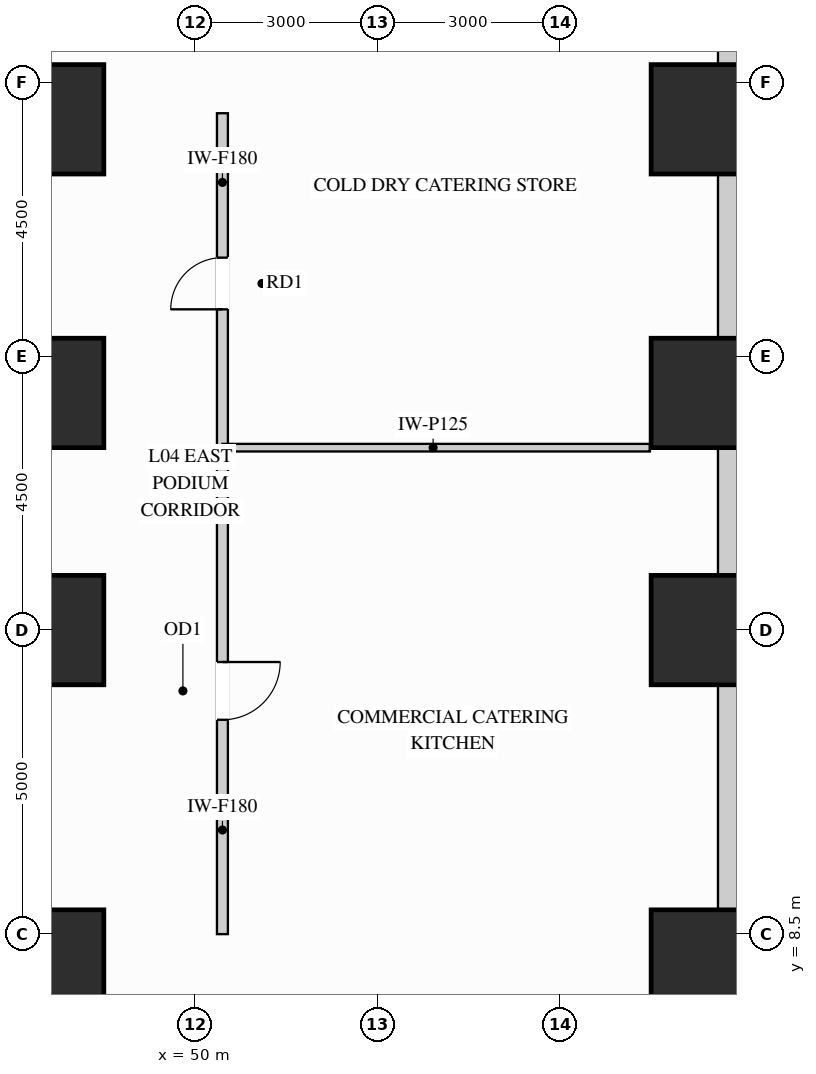
"""IFC4 building model, lengths in metres.
Left out: names, types, materials, properties, quantities, classifications, styles, units other than length and angle.
Written with IfcOpenShell. Run it as: python <this file> out.ifc"""

import sys

from ifc_helpers import new_model, si_unit, direction, frame, frame_2d, origin, origin_2d, place, context, subcontext, project, spatial, rectangle, extrude, source, transform, mapped, element, fill, save


model = new_model("IFC4")
c1 = context("Model", 3, precision=1e-05, world=origin(), true_north=direction((0.0, 1.0)))
c2 = subcontext(c1, "Body", "Model", "MODEL_VIEW")
j1 = project(units=[si_unit("LENGTHUNIT", "METRE"), si_unit("PLANEANGLEUNIT", "RADIAN")], contexts=[c1])
p1 = place(None, origin())
s1 = spatial("IfcSite", under=j1, at=p1, CompositionType="ELEMENT")
p2 = place(p1, origin())
s2 = spatial("IfcBuilding", under=s1, at=p2, CompositionType="ELEMENT")
p3 = place(p2, frame((0.0, 0.0, 18.0)))
s3 = spatial("IfcBuildingStorey", under=s2, at=p3, CompositionType="ELEMENT", Elevation=18.0)
m1 = source(origin(), c2, "Body", "SweptSolid", [
    extrude(rectangle(XDim=1.8, YDim=1.8, at=origin_2d()), origin(), (0.0, 0.0, 1.0), 4.28),
])
for number, where, z_axis, x_axis in (
    (1, (58.4, 8.0, 0.0), (0.0, 0.0, 1.0), (1.0, 0.0, 0.0)),
    (2, (58.4, 13.5, 0.0), (0.0, 0.0, 1.0), (1.0, 0.0, 0.0)),
    (3, (58.4, 17.4, 0.0), (0.0, 0.0, 1.0), (1.0, 0.0, 0.0)),
    (4, (58.4, 21.9, 0.0), (0.0, 0.0, 1.0), (1.0, 0.0, 0.0)),
    (5, (47.6, 8.0, 0.0), (0.0, 0.0, 1.0), (1.0, 0.0, 0.0)),
    (6, (47.6, 13.5, 0.0), (0.0, 0.0, 1.0), (1.0, 0.0, 0.0)),
    (7, (47.6, 17.4, 0.0), (0.0, 0.0, 1.0), (1.0, 0.0, 0.0)),
    (8, (47.6, 21.9, 0.0), (0.0, 0.0, 1.0), (1.0, 0.0, 0.0)),
):
    element("IfcColumn", number, at=place(p3, frame(where, z_axis=z_axis, x_axis=x_axis)), inside=s3, PredefinedType="COLUMN", context=c2, shape_type="MappedRepresentation", body=[
        mapped(m1, transform((0.0, 0.0, 0.0), x_axis=(1.0, 0.0, 0.0), y_axis=(0.0, 1.0, 0.0), z_axis=(0.0, 0.0, 1.0))),
    ])
m2 = source(origin(), c2, "Body", "SweptSolid", [
    extrude(rectangle(XDim=3.704, YDim=0.4, at=frame_2d((1.852, 0.0))), origin(), (0.0, 0.0, 1.0), 1.865),
])
p4 = place(p3, frame((58.8, 8.898, 0.0), z_axis=(0.0, 0.0, 1.0), x_axis=(0.0, 1.0, 0.0)))
e9 = element("IfcWall", 9, at=p4, inside=s3, PredefinedType="SOLIDWALL", context=c2, shape_type="MappedRepresentation", body=[
    mapped(m2, transform((0.0, 0.0, 0.0), x_axis=(1.0, 0.0, 0.0), y_axis=(0.0, 1.0, 0.0), z_axis=(0.0, 0.0, 1.0))),
])
m3 = source(origin(), c2, "Body", "SweptSolid", [
    extrude(rectangle(XDim=2.104, YDim=0.4, at=frame_2d((1.052, 0.0))), origin(), (0.0, 0.0, 1.0), 1.865),
])
p5 = place(p3, frame((58.8, 14.398, 0.0), z_axis=(0.0, 0.0, 1.0), x_axis=(0.0, 1.0, 0.0)))
e10 = element("IfcWall", 10, at=p5, inside=s3, PredefinedType="SOLIDWALL", context=c2, shape_type="MappedRepresentation", body=[
    mapped(m3, transform((0.0, 0.0, 0.0), x_axis=(1.0, 0.0, 0.0), y_axis=(0.0, 1.0, 0.0), z_axis=(0.0, 0.0, 1.0))),
])
m4 = source(origin(), c2, "Body", "SweptSolid", [
    extrude(rectangle(XDim=2.704, YDim=0.4, at=frame_2d((1.352, 0.0))), origin(), (0.0, 0.0, 1.0), 1.865),
])
p6 = place(p3, frame((58.8, 18.298, 0.0), z_axis=(0.0, 0.0, 1.0), x_axis=(0.0, 1.0, 0.0)))
e11 = element("IfcWall", 11, at=p6, inside=s3, PredefinedType="SOLIDWALL", context=c2, shape_type="MappedRepresentation", body=[
    mapped(m4, transform((0.0, 0.0, 0.0), x_axis=(1.0, 0.0, 0.0), y_axis=(0.0, 1.0, 0.0), z_axis=(0.0, 0.0, 1.0))),
])
m5 = source(origin(), c2, "Body", "SweptSolid", [
    extrude(rectangle(XDim=1.504, YDim=0.4, at=frame_2d((0.752, 0.0))), origin(), (0.0, 0.0, 1.0), 1.865),
])
p7 = place(p3, frame((58.8, 22.798, 0.0), z_axis=(0.0, 0.0, 1.0), x_axis=(0.0, 1.0, 0.0)))
e12 = element("IfcWall", 12, at=p7, inside=s3, PredefinedType="SOLIDWALL", context=c2, shape_type="MappedRepresentation", body=[
    mapped(m5, transform((0.0, 0.0, 0.0), x_axis=(1.0, 0.0, 0.0), y_axis=(0.0, 1.0, 0.0), z_axis=(0.0, 0.0, 1.0))),
])
p8 = place(p3, frame((50.45, 8.5, 0.0), z_axis=(0.0, 0.0, 1.0), x_axis=(0.0, 1.0, 0.0)))
e13 = element("IfcWall", 13, at=p8, inside=s3, PredefinedType="PARTITIONING", context=c2, shape_type="SweptSolid", body=[
    extrude(rectangle(XDim=8.0, YDim=0.18, at=frame_2d((4.0, 0.0))), origin(), (0.0, 0.0, 1.0), 4.265),
])
p9 = place(p8, frame((3.525, 0.0, 0.0)))
e14 = element("IfcOpeningElement", 14, at=p9, cuts=e13, PredefinedType="OPENING", context=c2, shape_type="SweptSolid", body=[
    extrude(rectangle(XDim=0.95, YDim=2.15, at=frame_2d((0.475, 1.075))), frame((0.0, 0.1, 0.0), z_axis=(0.0, -1.0, 0.0), x_axis=(1.0, 0.0, 0.0)), (0.0, 0.0, 1.0), 0.2),
])
p10 = place(p3, frame((50.45, 16.5, 0.0), z_axis=(0.0, 0.0, 1.0), x_axis=(0.0, 1.0, 0.0)))
e15 = element("IfcWall", 15, at=p10, inside=s3, PredefinedType="PARTITIONING", context=c2, shape_type="SweptSolid", body=[
    extrude(rectangle(XDim=5.5, YDim=0.18, at=frame_2d((2.75, 0.0))), origin(), (0.0, 0.0, 1.0), 4.265),
])
p11 = place(p10, frame((2.275, 0.0, 0.0)))
e16 = element("IfcOpeningElement", 16, at=p11, cuts=e15, PredefinedType="OPENING", context=c2, shape_type="SweptSolid", body=[
    extrude(rectangle(XDim=0.85, YDim=2.1, at=frame_2d((0.425, 1.05))), frame((0.0, 0.1, 0.0), z_axis=(0.0, -1.0, 0.0), x_axis=(1.0, 0.0, 0.0)), (0.0, 0.0, 1.0), 0.2),
])
m6 = source(origin(), c2, "Body", "SweptSolid", [
    extrude(rectangle(XDim=7.03, YDim=0.125, at=frame_2d((3.515, 0.0))), origin(), (0.0, 0.0, 1.0), 4.265),
])
p12 = place(p3, frame((50.45, 16.5, 0.0), z_axis=(0.0, 0.0, 1.0), x_axis=(1.0, 0.0, 0.0)))
e17 = element("IfcWall", 17, at=p12, inside=s3, PredefinedType="PARTITIONING", context=c2, shape_type="MappedRepresentation", body=[
    mapped(m6, transform((0.0, 0.0, 0.0), x_axis=(1.0, 0.0, 0.0), y_axis=(0.0, 1.0, 0.0), z_axis=(0.0, 0.0, 1.0))),
])
m7 = source(origin(), c2, "Body", "SweptSolid", [
    extrude(rectangle(XDim=0.95, YDim=2.15, at=frame_2d((0.475, 1.075))), frame((0.0, 0.025, 0.0), z_axis=(0.0, -1.0, 0.0), x_axis=(1.0, 0.0, 0.0)), (0.0, 0.0, 1.0), 0.05),
])
p13 = place(p9, origin())
e18 = element("IfcDoor", 18, at=p13, inside=s3, OperationType="SINGLE_SWING_RIGHT", PredefinedType="DOOR", context=c2, shape_type="MappedRepresentation", body=[
    mapped(m7, transform((0.0, 0.0, 0.0), x_axis=(1.0, 0.0, 0.0), y_axis=(0.0, 1.0, 0.0), z_axis=(0.0, 0.0, 1.0))),
])
fill(e14, e18)
m8 = source(origin(), c2, "Body", "SweptSolid", [
    extrude(rectangle(XDim=0.85, YDim=2.1, at=frame_2d((0.425, 1.05))), frame((0.0, 0.025, 0.0), z_axis=(0.0, -1.0, 0.0), x_axis=(1.0, 0.0, 0.0)), (0.0, 0.0, 1.0), 0.05),
])
p14 = place(p11, origin())
e19 = element("IfcDoor", 19, at=p14, inside=s3, OperationType="SINGLE_SWING_LEFT", PredefinedType="DOOR", context=c2, shape_type="MappedRepresentation", body=[
    mapped(m8, transform((0.0, 0.0, 0.0), x_axis=(1.0, 0.0, 0.0), y_axis=(0.0, 1.0, 0.0), z_axis=(0.0, 0.0, 1.0))),
])
fill(e16, e19)
save(model, sys.argv[1])
